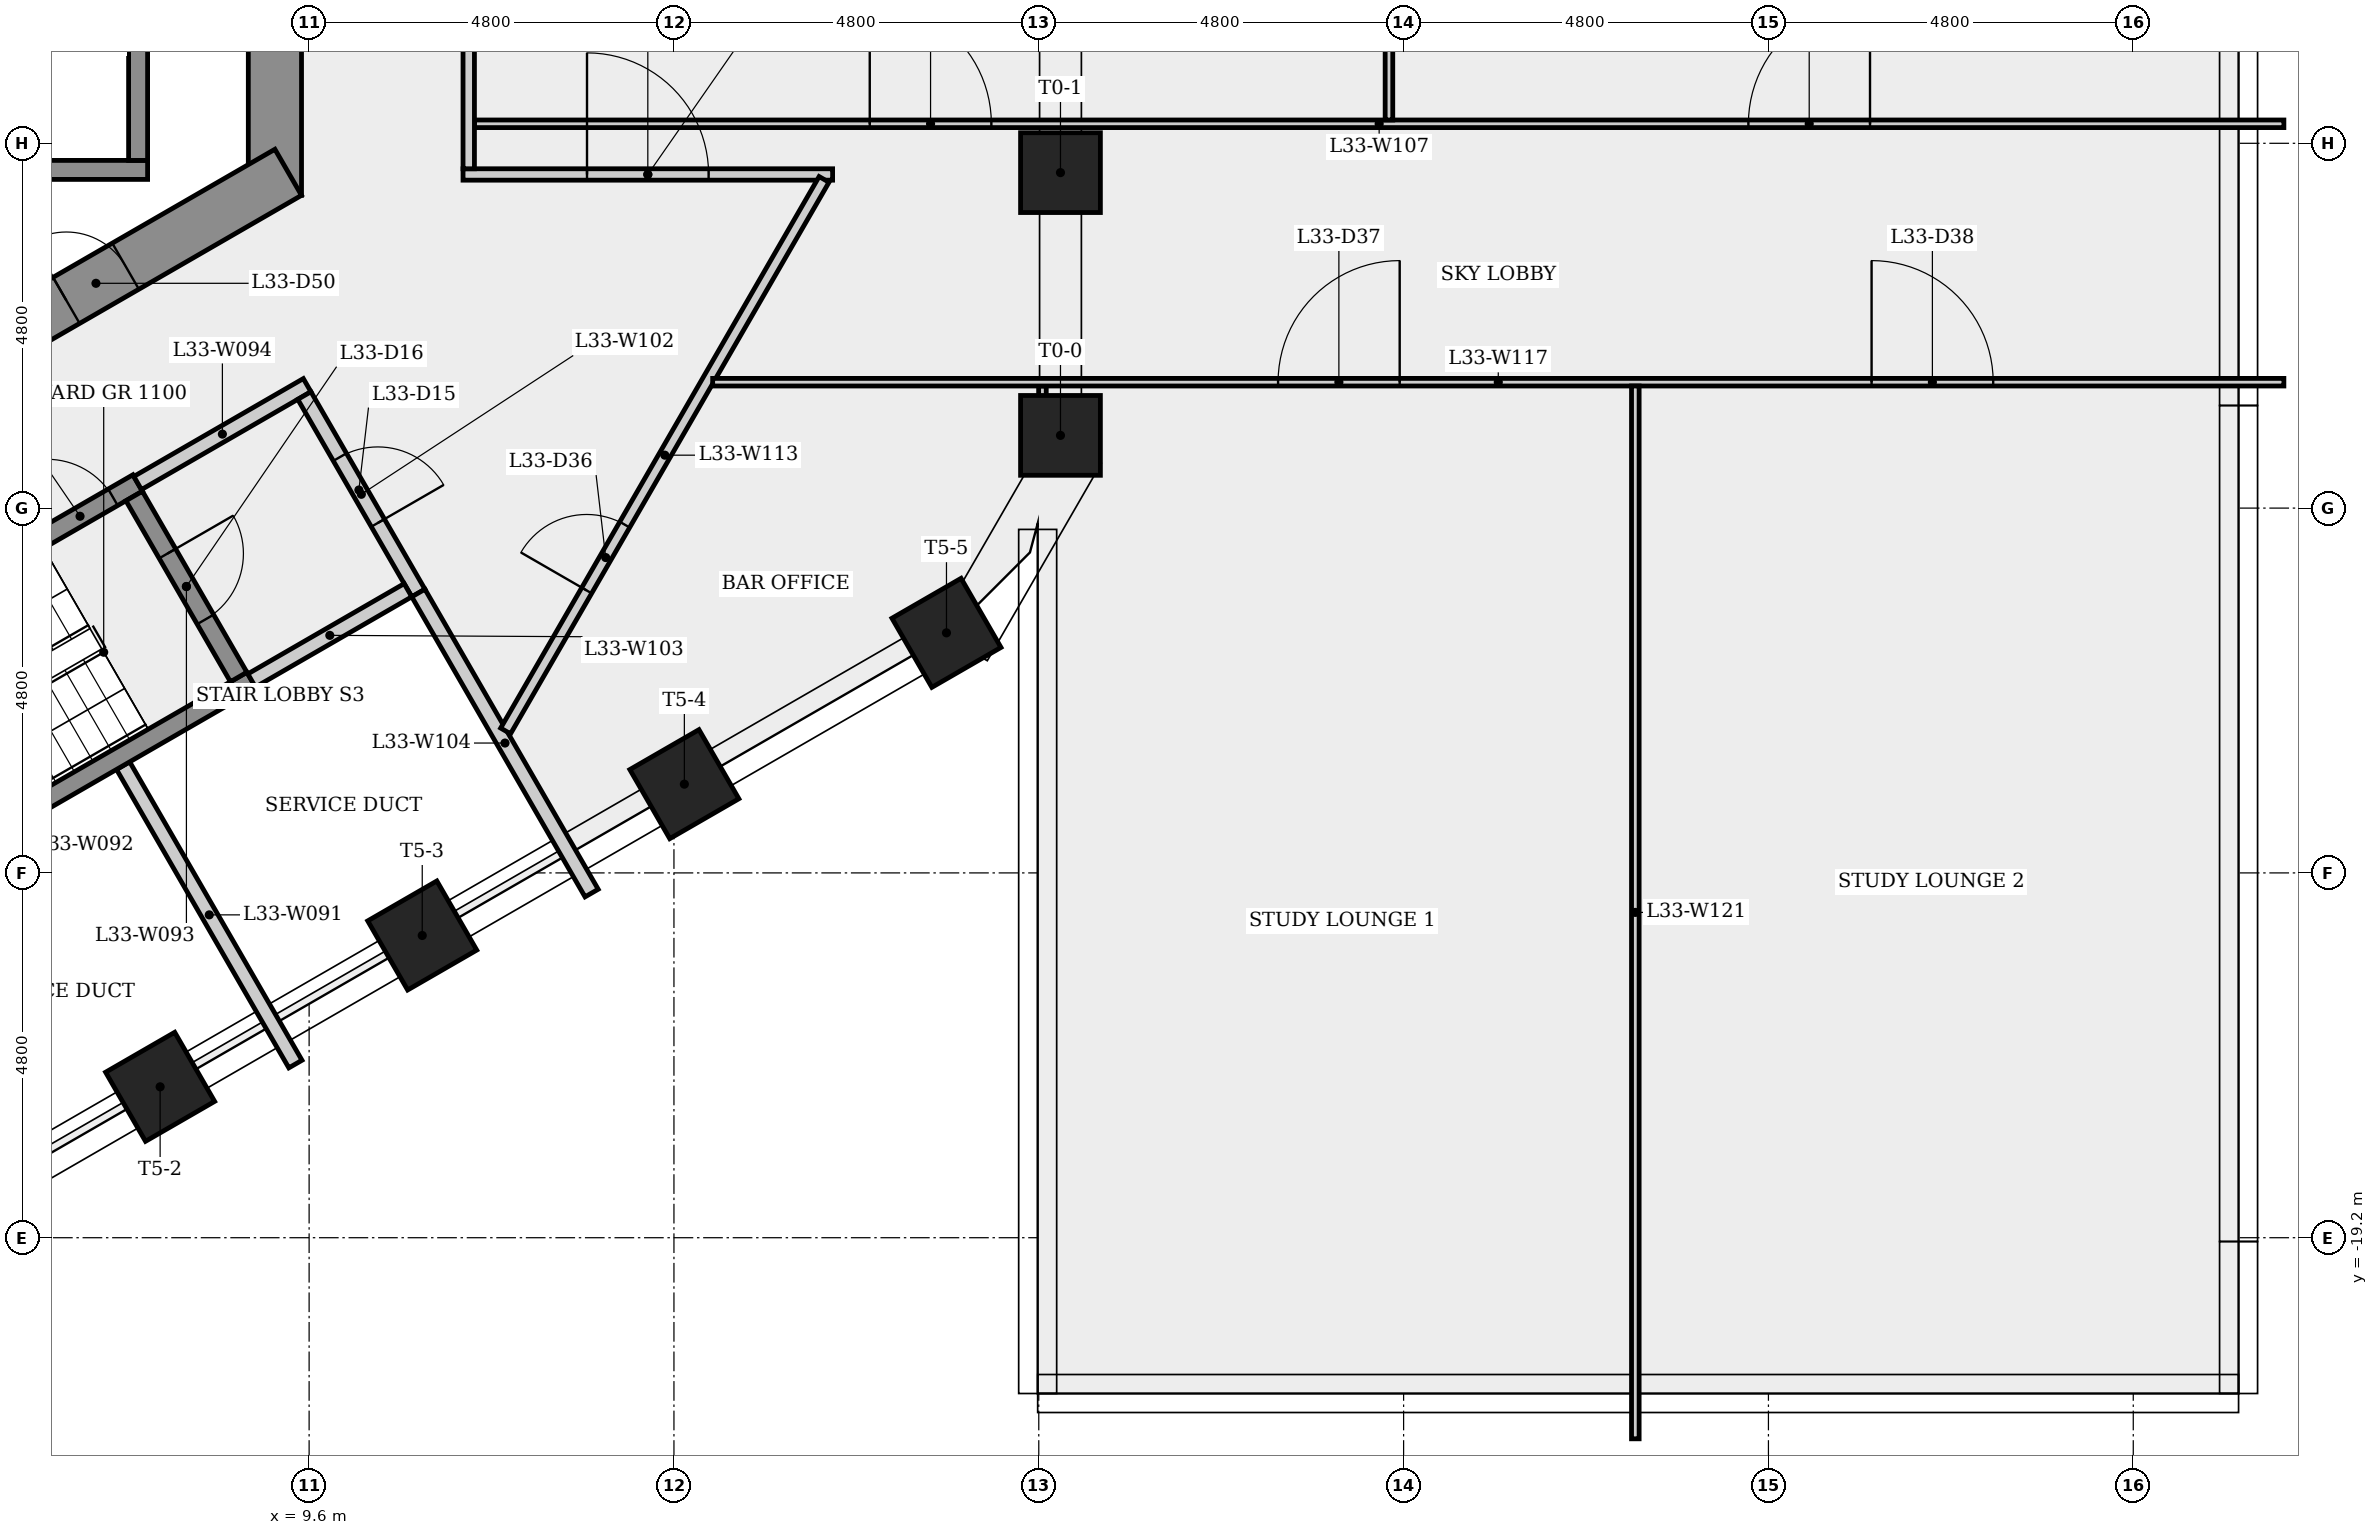
"""IFC4 building model, lengths in metres.
Left out: names, types, materials, properties, quantities, classifications, styles, units other than length and angle.
Written with IfcOpenShell. Run it as: python <this file> out.ifc"""

import sys

from ifc_helpers import new_model, si_unit, direction, frame, frame_2d, origin, origin_2d, place, context, subcontext, project, spatial, rectangle, extrude, element, fill, save


model = new_model("IFC4")
c1 = context("Model", 3, precision=1e-05, world=origin(), true_north=direction((0.0, 1.0)))
c2 = subcontext(c1, "Body", "Model", "MODEL_VIEW")
j1 = project(units=[si_unit("LENGTHUNIT", "METRE"), si_unit("PLANEANGLEUNIT", "RADIAN")], contexts=[c1])
p1 = place(None, origin())
s1 = spatial("IfcSite", under=j1, at=p1, CompositionType="ELEMENT")
p2 = place(p1, origin())
s2 = spatial("IfcBuilding", under=s1, at=p2, CompositionType="ELEMENT")
p3 = place(p2, frame((0.0, 0.0, 124.5)))
s3 = spatial("IfcBuildingStorey", under=s2, at=p3, CompositionType="ELEMENT", Elevation=124.5)
p4 = place(p3, frame((9.15, -5.485, 0.0), z_axis=(0.0, 0.0, 1.0), x_axis=(0.0, 1.0, 0.0)))
e1 = element("IfcWall", 1, at=p4, inside=s3, PredefinedType="SHEAR", context=c2, shape_type="SweptSolid", body=[
    extrude(rectangle(XDim=10.97, YDim=0.7, at=frame_2d((5.485, 0.0))), origin(), (0.0, 0.0, 1.0), 4.0),
])
p5 = place(p4, frame((4.685, 0.0, 0.0)))
e2 = element("IfcOpeningElement", 2, at=p5, cuts=e1, PredefinedType="OPENING", context=c2, shape_type="SweptSolid", body=[
    extrude(rectangle(XDim=1.6, YDim=2.1, at=frame_2d((0.8, 1.05))), frame((0.0, 0.36, 0.0), z_axis=(0.0, -1.0, 0.0), x_axis=(1.0, 0.0, 0.0)), (0.0, 0.0, 1.0), 0.72),
])
p6 = place(p3, frame((-0.175, -10.667, 0.0), z_axis=(0.0, 0.0, 1.0), x_axis=(0.866023993627, 0.500002442456, 0.0)))
e3 = element("IfcWall", 3, at=p6, inside=s3, PredefinedType="SHEAR", context=c2, shape_type="SweptSolid", body=[
    extrude(rectangle(XDim=10.97, YDim=0.7, at=frame_2d((5.485, 0.0))), origin(), (0.0, 0.0, 1.0), 4.0),
])
p7 = place(p6, frame((7.599, 0.0, 0.0)))
e4 = element("IfcOpeningElement", 4, at=p7, cuts=e3, PredefinedType="OPENING", context=c2, shape_type="SweptSolid", body=[
    extrude(rectangle(XDim=0.9, YDim=2.1, at=frame_2d((0.45, 1.05))), frame((0.0, 0.36, 0.0), z_axis=(0.0, -1.0, 0.0), x_axis=(1.0, 0.0, 0.0)), (0.0, 0.0, 1.0), 0.72),
])
for number, where, z_axis, x_axis in (
    (5, (19.486, -8.643, 0.0), (0.0, 0.0, 1.0), (1.0, 0.0, 0.0)),
    (6, (19.486, -5.186, 0.0), (0.0, 0.0, 1.0), (1.0, 0.0, 0.0)),
    (7, (7.64, -17.214, 0.0), (0.0, 0.0, 1.0), (0.5, -0.866, 0.0)),
    (8, (11.088, -15.223, 0.0), (0.0, 0.0, 1.0), (0.5, -0.866, 0.0)),
    (9, (14.537, -13.232, 0.0), (0.0, 0.0, 1.0), (0.5, -0.866, 0.0)),
    (10, (17.986, -11.241, 0.0), (0.0, 0.0, 1.0), (0.5, -0.866, 0.0)),
):
    element("IfcColumn", number, at=place(p3, frame(where, z_axis=z_axis, x_axis=x_axis)), inside=s3, PredefinedType="COLUMN", context=c2, shape_type="SweptSolid", body=[
        extrude(rectangle(XDim=1.05, YDim=1.05, at=origin_2d()), origin(), (0.0, 0.0, 1.0), 4.0),
    ])
p8 = place(p3, frame((-7.225, -5.15, 0.0), z_axis=(0.0, 0.0, 1.0), x_axis=(1.0, 0.0, 0.0)))
e11 = element("IfcWall", 11, at=p8, inside=s3, PredefinedType="SHEAR", context=c2, shape_type="SweptSolid", body=[
    extrude(rectangle(XDim=14.7, YDim=0.25, at=frame_2d((7.35, 0.0))), origin(), (0.0, 0.0, 1.0), 3.6),
])
p9 = place(p3, frame((1.585, -12.595, 0.0), z_axis=(0.0, 0.0, 1.0), x_axis=(0.866036417653, 0.499980922934, 0.0)))
e12 = element("IfcWall", 12, at=p9, inside=s3, PredefinedType="SHEAR", context=c2, shape_type="SweptSolid", body=[
    extrude(rectangle(XDim=6.65, YDim=0.25, at=frame_2d((3.325, 0.0))), origin(), (0.0, 0.0, 1.0), 3.6),
])
p10 = place(p9, frame((5.275, 0.0, 0.0)))
e13 = element("IfcOpeningElement", 13, at=p10, cuts=e12, PredefinedType="OPENING", context=c2, shape_type="SweptSolid", body=[
    extrude(rectangle(XDim=1.0, YDim=2.1, at=frame_2d((0.5, 1.05))), frame((0.0, 0.135, 0.0), z_axis=(0.0, -1.0, 0.0), x_axis=(1.0, 0.0, 0.0)), (0.0, 0.0, 1.0), 0.27),
])
p11 = place(p3, frame((7.153, -12.989, 0.0), z_axis=(0.0, 0.0, 1.0), x_axis=(0.50001920778, -0.866014313884, 0.0)))
e14 = element("IfcWall", 14, at=p11, inside=s3, PredefinedType="PLUMBINGWALL", context=c2, shape_type="SweptSolid", body=[
    extrude(rectangle(XDim=4.534, YDim=0.2, at=frame_2d((2.267, 0.0))), origin(), (0.0, 0.0, 1.0), 3.6),
])
p12 = place(p3, frame((3.301, -15.068, 0.0), z_axis=(0.0, 0.0, 1.0), x_axis=(0.866035036182, 0.499983315828, 0.0)))
e15 = element("IfcWall", 15, at=p12, inside=s3, PredefinedType="SHEAR", context=c2, shape_type="SweptSolid", body=[
    extrude(rectangle(XDim=6.4, YDim=0.25, at=frame_2d((3.2, 0.0))), origin(), (0.0, 0.0, 1.0), 4.0),
])
p13 = place(p3, frame((7.298, -9.441, 0.0), z_axis=(0.0, 0.0, 1.0), x_axis=(0.500034990121, -0.866005201286, 0.0)))
e16 = element("IfcWall", 16, at=p13, inside=s3, PredefinedType="SHEAR", context=c2, shape_type="SweptSolid", body=[
    extrude(rectangle(XDim=2.75, YDim=0.25, at=frame_2d((1.375, 0.0))), origin(), (0.0, 0.0, 1.0), 3.6),
])
p14 = place(p13, frame((0.875, 0.0, 0.0)))
e17 = element("IfcOpeningElement", 17, at=p14, cuts=e16, PredefinedType="OPENING", context=c2, shape_type="SweptSolid", body=[
    extrude(rectangle(XDim=1.0, YDim=2.1, at=frame_2d((0.5, 1.05))), frame((0.0, 0.135, 0.0), z_axis=(0.0, -1.0, 0.0), x_axis=(1.0, 0.0, 0.0)), (0.0, 0.0, 1.0), 0.27),
])
p15 = place(p3, frame((7.344, -9.27, 0.0), z_axis=(0.0, 0.0, 1.0), x_axis=(0.866005588531, 0.500034319456, 0.0)))
e18 = element("IfcWall", 18, at=p15, inside=s3, PredefinedType="PARTITIONING", context=c2, shape_type="SweptSolid", body=[
    extrude(rectangle(XDim=2.575, YDim=0.2, at=frame_2d((1.288, 0.0))), origin(), (0.0, 0.0, 1.0), 3.6),
])
p16 = place(p3, frame((7.35, -1.925, 0.0), z_axis=(0.0, 0.0, 1.0), x_axis=(0.0, -1.0, 0.0)))
e19 = element("IfcWall", 19, at=p16, inside=s3, PredefinedType="SHEAR", context=c2, shape_type="SweptSolid", body=[
    extrude(rectangle(XDim=3.1, YDim=0.25, at=frame_2d((1.55, 0.0))), origin(), (0.0, 0.0, 1.0), 4.0),
])
p17 = place(p3, frame((9.537, -8.119, 0.0), z_axis=(0.0, 0.0, 1.0), x_axis=(0.499990139034, -0.866031096941, 0.0)))
e20 = element("IfcWall", 20, at=p17, inside=s3, PredefinedType="PARTITIONING", context=c2, shape_type="SweptSolid", body=[
    extrude(rectangle(XDim=3.0, YDim=0.2, at=frame_2d((1.5, 0.0))), origin(), (0.0, 0.0, 1.0), 3.6),
])
p18 = place(p17, frame((0.935, 0.0, 0.0)))
e21 = element("IfcOpeningElement", 21, at=p18, cuts=e20, PredefinedType="OPENING", context=c2, shape_type="SweptSolid", body=[
    extrude(rectangle(XDim=1.0, YDim=2.1, at=frame_2d((0.5, 1.05))), frame((0.0, 0.11, 0.0), z_axis=(0.0, -1.0, 0.0), x_axis=(1.0, 0.0, 0.0)), (0.0, 0.0, 1.0), 0.22),
])
p19 = place(p3, frame((10.901, -10.681, 0.0), z_axis=(0.0, 0.0, 1.0), x_axis=(-0.866007538022, -0.500030943131, 0.0)))
e22 = element("IfcWall", 22, at=p19, inside=s3, PredefinedType="PLUMBINGWALL", context=c2, shape_type="SweptSolid", body=[
    extrude(rectangle(XDim=2.375, YDim=0.2, at=frame_2d((1.188, 0.0))), origin(), (0.0, 0.0, 1.0), 3.6),
])
p20 = place(p3, frame((11.037, -10.717, 0.0), z_axis=(0.0, 0.0, 1.0), x_axis=(0.500026861956, -0.866009894472, 0.0)))
e23 = element("IfcWall", 23, at=p20, inside=s3, PredefinedType="PLUMBINGWALL", context=c2, shape_type="SweptSolid", body=[
    extrude(rectangle(XDim=4.559, YDim=0.2, at=frame_2d((2.279, 0.0))), origin(), (0.0, 0.0, 1.0), 3.6),
])
p21 = place(p3, frame((11.625, -5.21, 0.0), z_axis=(0.0, 0.0, 1.0), x_axis=(1.0, 0.0, 0.0)))
e24 = element("IfcWall", 24, at=p21, inside=s3, PredefinedType="PARTITIONING", context=c2, shape_type="SweptSolid", body=[
    extrude(rectangle(XDim=4.863, YDim=0.15, at=frame_2d((2.431, 0.0))), origin(), (0.0, 0.0, 1.0), 3.6),
])
p22 = place(p21, frame((1.631, 0.0, 0.0)))
e25 = element("IfcOpeningElement", 25, at=p22, cuts=e24, PredefinedType="OPENING", context=c2, shape_type="SweptSolid", body=[
    extrude(rectangle(XDim=1.6, YDim=2.1, at=frame_2d((0.8, 1.05))), frame((0.0, 0.085, 0.0), z_axis=(0.0, -1.0, 0.0), x_axis=(1.0, 0.0, 0.0)), (0.0, 0.0, 1.0), 0.17),
])
p23 = place(p3, frame((11.775, -4.543, 0.0), z_axis=(0.0, 0.0, 1.0), x_axis=(1.0, 0.0, 0.0)))
e26 = element("IfcWall", 26, at=p23, inside=s3, PredefinedType="PARTITIONING", context=c2, shape_type="SweptSolid", body=[
    extrude(rectangle(XDim=23.807, YDim=0.1, at=frame_2d((11.903, 0.0))), origin(), (0.0, 0.0, 1.0), 3.6),
])
p24 = place(p23, frame((5.201, 0.0, 0.0)))
e27 = element("IfcOpeningElement", 27, at=p24, cuts=e26, PredefinedType="OPENING", context=c2, shape_type="SweptSolid", body=[
    extrude(rectangle(XDim=1.6, YDim=2.1, at=frame_2d((0.8, 1.05))), frame((0.0, 0.06, 0.0), z_axis=(0.0, -1.0, 0.0), x_axis=(1.0, 0.0, 0.0)), (0.0, 0.0, 1.0), 0.12),
])
p25 = place(p23, frame((16.761, 0.0, 0.0)))
e28 = element("IfcOpeningElement", 28, at=p25, cuts=e26, PredefinedType="OPENING", context=c2, shape_type="SweptSolid", body=[
    extrude(rectangle(XDim=1.6, YDim=2.1, at=frame_2d((0.8, 1.05))), frame((0.0, 0.06, 0.0), z_axis=(0.0, -1.0, 0.0), x_axis=(1.0, 0.0, 0.0)), (0.0, 0.0, 1.0), 0.12),
])
p26 = place(p3, frame((11.7, -5.135, 0.0), z_axis=(0.0, 0.0, 1.0), x_axis=(0.0, 1.0, 0.0)))
e29 = element("IfcWall", 29, at=p26, inside=s3, PredefinedType="PARTITIONING", context=c2, shape_type="SweptSolid", body=[
    extrude(rectangle(XDim=10.42, YDim=0.15, at=frame_2d((5.21, 0.0))), origin(), (0.0, 0.0, 1.0), 3.6),
])
p27 = place(p3, frame((12.185, -12.532, 0.0), z_axis=(0.0, 0.0, 1.0), x_axis=(0.500018368146, 0.86601479867, 0.0)))
e30 = element("IfcWall", 30, at=p27, inside=s3, PredefinedType="PARTITIONING", context=c2, shape_type="SweptSolid", body=[
    extrude(rectangle(XDim=8.38, YDim=0.15, at=frame_2d((4.19, 0.0))), origin(), (0.0, 0.0, 1.0), 3.6),
])
p28 = place(p27, frame((2.135, 0.0, 0.0)))
e31 = element("IfcOpeningElement", 31, at=p28, cuts=e30, PredefinedType="OPENING", context=c2, shape_type="SweptSolid", body=[
    extrude(rectangle(XDim=1.0, YDim=2.1, at=frame_2d((0.5, 1.05))), frame((0.0, 0.085, 0.0), z_axis=(0.0, -1.0, 0.0), x_axis=(1.0, 0.0, 0.0)), (0.0, 0.0, 1.0), 0.17),
])
p29 = place(p3, frame((19.248, -7.993, 0.0), z_axis=(0.0, 0.0, 1.0), x_axis=(0.0, -1.0, 0.0)))
e32 = element("IfcWall", 32, at=p29, inside=s3, PredefinedType="PARTITIONING", context=c2, shape_type="SweptSolid", body=[
    extrude(rectangle(XDim=1.062, YDim=0.1, at=frame_2d((0.531, 0.0))), origin(), (0.0, 0.0, 1.0), 2.725),
])
p30 = place(p3, frame((14.909, -7.943, 0.0), z_axis=(0.0, 0.0, 1.0), x_axis=(1.0, 0.0, 0.0)))
e33 = element("IfcWall", 33, at=p30, inside=s3, PredefinedType="PARTITIONING", context=c2, shape_type="SweptSolid", body=[
    extrude(rectangle(XDim=20.672, YDim=0.1, at=frame_2d((10.336, 0.0))), origin(), (0.0, 0.0, 1.0), 3.6),
])
p31 = place(p30, frame((7.439, 0.0, 0.0)))
e34 = element("IfcOpeningElement", 34, at=p31, cuts=e33, PredefinedType="OPENING", context=c2, shape_type="SweptSolid", body=[
    extrude(rectangle(XDim=1.6, YDim=2.1, at=frame_2d((0.8, 1.05))), frame((0.0, 0.06, 0.0), z_axis=(0.0, -1.0, 0.0), x_axis=(1.0, 0.0, 0.0)), (0.0, 0.0, 1.0), 0.12),
])
p32 = place(p30, frame((15.248, 0.0, 0.0)))
e35 = element("IfcOpeningElement", 35, at=p32, cuts=e33, PredefinedType="OPENING", context=c2, shape_type="SweptSolid", body=[
    extrude(rectangle(XDim=1.6, YDim=2.1, at=frame_2d((0.8, 1.05))), frame((0.0, 0.06, 0.0), z_axis=(0.0, -1.0, 0.0), x_axis=(1.0, 0.0, 0.0)), (0.0, 0.0, 1.0), 0.12),
])
p33 = place(p3, frame((23.807, 2.093, 0.0), z_axis=(0.0, 0.0, 1.0), x_axis=(0.0, -1.0, 0.0)))
e36 = element("IfcWall", 36, at=p33, inside=s3, PredefinedType="PARTITIONING", context=c2, shape_type="SweptSolid", body=[
    extrude(rectangle(XDim=6.587, YDim=0.1, at=frame_2d((3.293, 0.0))), origin(), (0.0, 0.0, 1.0), 3.6),
])
p34 = place(p3, frame((27.049, -7.993, 0.0), z_axis=(0.0, 0.0, 1.0), x_axis=(0.0, -1.0, 0.0)))
e37 = element("IfcWall", 37, at=p34, inside=s3, PredefinedType="PARTITIONING", context=c2, shape_type="SweptSolid", body=[
    extrude(rectangle(XDim=13.853, YDim=0.1, at=frame_2d((6.926, 0.0))), origin(), (0.0, 0.0, 1.0), 3.6),
])
p35 = place(p10, origin())
e38 = element("IfcDoor", 38, at=p35, inside=s3, OperationType="SINGLE_SWING_LEFT", PredefinedType="DOOR", context=c2, shape_type="SweptSolid", body=[
    extrude(rectangle(XDim=1.0, YDim=2.1, at=frame_2d((0.5, 1.05))), frame((0.0, 0.025, 0.0), z_axis=(0.0, -1.0, 0.0), x_axis=(1.0, 0.0, 0.0)), (0.0, 0.0, 1.0), 0.05),
])
fill(e13, e38)
p36 = place(p18, origin())
e39 = element("IfcDoor", 39, at=p36, inside=s3, OperationType="SINGLE_SWING_RIGHT", PredefinedType="DOOR", context=c2, shape_type="SweptSolid", body=[
    extrude(rectangle(XDim=1.0, YDim=2.1, at=frame_2d((0.5, 1.05))), frame((0.0, 0.025, 0.0), z_axis=(0.0, -1.0, 0.0), x_axis=(1.0, 0.0, 0.0)), (0.0, 0.0, 1.0), 0.05),
])
fill(e21, e39)
p37 = place(p14, origin())
e40 = element("IfcDoor", 40, at=p37, inside=s3, OperationType="SINGLE_SWING_LEFT", PredefinedType="DOOR", context=c2, shape_type="SweptSolid", body=[
    extrude(rectangle(XDim=1.0, YDim=2.1, at=frame_2d((0.5, 1.05))), frame((0.0, 0.025, 0.0), z_axis=(0.0, -1.0, 0.0), x_axis=(1.0, 0.0, 0.0)), (0.0, 0.0, 1.0), 0.05),
])
fill(e17, e40)
p38 = place(p22, origin())
e41 = element("IfcDoor", 41, at=p38, inside=s3, OperationType="SINGLE_SWING_LEFT", PredefinedType="DOOR", context=c2, shape_type="SweptSolid", body=[
    extrude(rectangle(XDim=1.6, YDim=2.1, at=frame_2d((0.8, 1.05))), frame((0.0, 0.025, 0.0), z_axis=(0.0, -1.0, 0.0), x_axis=(1.0, 0.0, 0.0)), (0.0, 0.0, 1.0), 0.05),
])
fill(e25, e41)
p39 = place(p28, origin())
e42 = element("IfcDoor", 42, at=p39, inside=s3, OperationType="SINGLE_SWING_LEFT", PredefinedType="DOOR", context=c2, shape_type="SweptSolid", body=[
    extrude(rectangle(XDim=1.0, YDim=2.1, at=frame_2d((0.5, 1.05))), frame((0.0, 0.025, 0.0), z_axis=(0.0, -1.0, 0.0), x_axis=(1.0, 0.0, 0.0)), (0.0, 0.0, 1.0), 0.05),
])
fill(e31, e42)
p40 = place(p31, origin())
e43 = element("IfcDoor", 43, at=p40, inside=s3, OperationType="SINGLE_SWING_RIGHT", PredefinedType="DOOR", context=c2, shape_type="SweptSolid", body=[
    extrude(rectangle(XDim=1.6, YDim=2.1, at=frame_2d((0.8, 1.05))), frame((0.0, 0.025, 0.0), z_axis=(0.0, -1.0, 0.0), x_axis=(1.0, 0.0, 0.0)), (0.0, 0.0, 1.0), 0.05),
])
fill(e34, e43)
p41 = place(p32, origin())
e44 = element("IfcDoor", 44, at=p41, inside=s3, OperationType="SINGLE_SWING_LEFT", PredefinedType="DOOR", context=c2, shape_type="SweptSolid", body=[
    extrude(rectangle(XDim=1.6, YDim=2.1, at=frame_2d((0.8, 1.05))), frame((0.0, 0.025, 0.0), z_axis=(0.0, -1.0, 0.0), x_axis=(1.0, 0.0, 0.0)), (0.0, 0.0, 1.0), 0.05),
])
fill(e35, e44)
p42 = place(p24, origin())
e45 = element("IfcDoor", 45, at=p42, inside=s3, OperationType="SINGLE_SWING_LEFT", PredefinedType="DOOR", context=c2, shape_type="SweptSolid", body=[
    extrude(rectangle(XDim=1.6, YDim=2.1, at=frame_2d((0.8, 1.05))), frame((0.0, 0.025, 0.0), z_axis=(0.0, -1.0, 0.0), x_axis=(1.0, 0.0, 0.0)), (0.0, 0.0, 1.0), 0.05),
])
fill(e27, e45)
p43 = place(p25, origin())
e46 = element("IfcDoor", 46, at=p43, inside=s3, OperationType="SINGLE_SWING_RIGHT", PredefinedType="DOOR", context=c2, shape_type="SweptSolid", body=[
    extrude(rectangle(XDim=1.6, YDim=2.1, at=frame_2d((0.8, 1.05))), frame((0.0, 0.025, 0.0), z_axis=(0.0, -1.0, 0.0), x_axis=(1.0, 0.0, 0.0)), (0.0, 0.0, 1.0), 0.05),
])
fill(e28, e46)
p44 = place(p7, origin())
e47 = element("IfcDoor", 47, at=p44, inside=s3, OperationType="SINGLE_SWING_LEFT", PredefinedType="DOOR", context=c2, shape_type="SweptSolid", body=[
    extrude(rectangle(XDim=0.9, YDim=2.1, at=frame_2d((0.45, 1.05))), frame((0.0, 0.025, 0.0), z_axis=(0.0, -1.0, 0.0), x_axis=(1.0, 0.0, 0.0)), (0.0, 0.0, 1.0), 0.05),
])
fill(e4, e47)
save(model, sys.argv[1])
